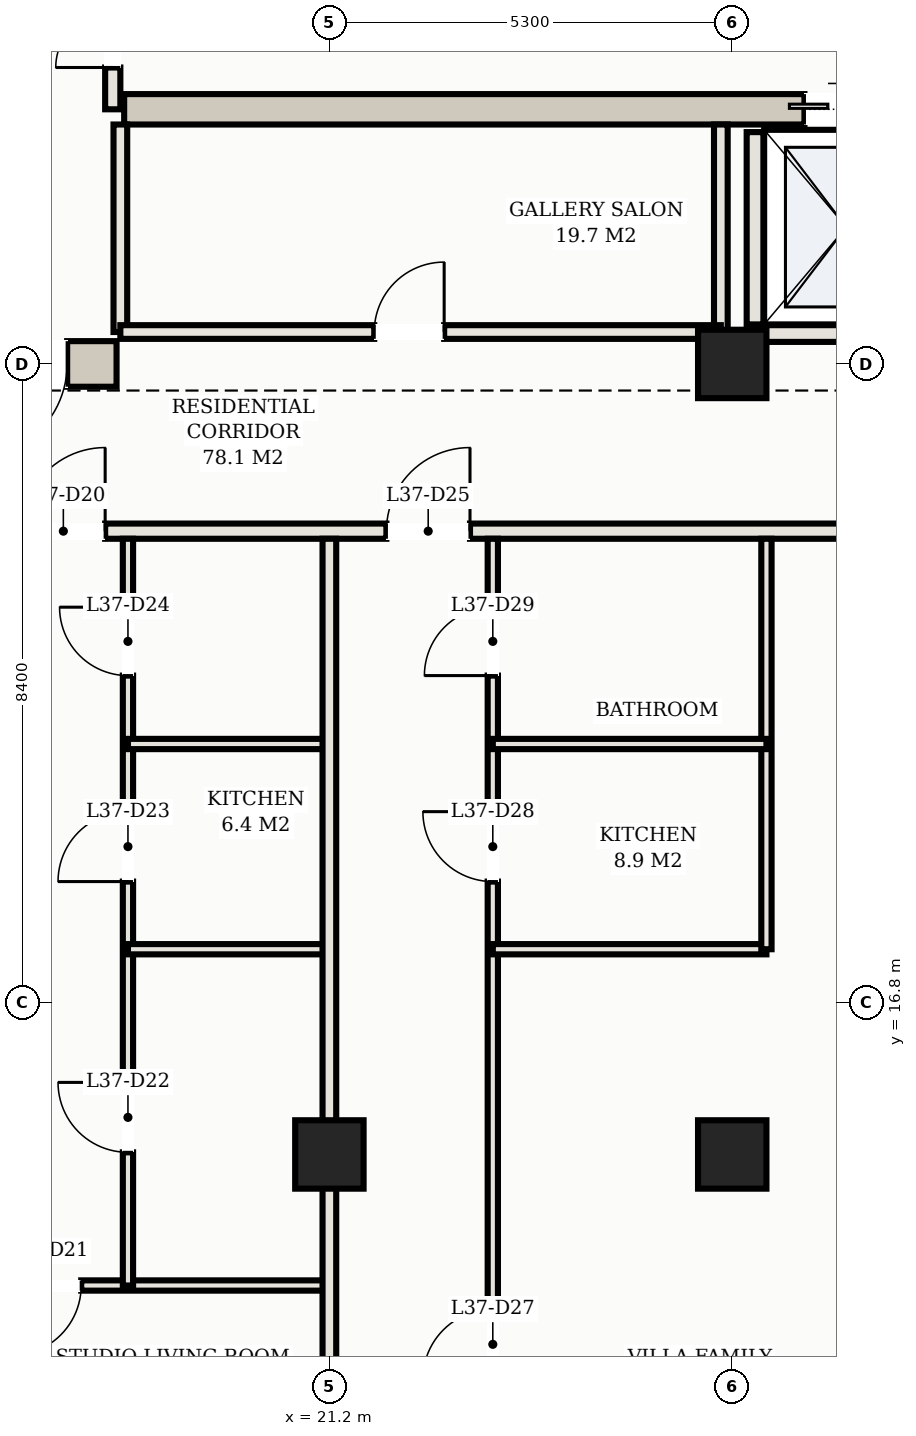
"""IFC4 building model, lengths in metres.
Left out: names, types, materials, properties, quantities, classifications, styles, units other than length and angle.
Written with IfcOpenShell. Run it as: python <this file> out.ifc"""

import sys

from ifc_helpers import new_model, si_unit, direction, frame, frame_2d, origin, origin_2d, place, context, subcontext, project, spatial, rectangle, hollow_rectangle, extrude, element, fill, save


model = new_model("IFC4")
c1 = context("Model", 3, precision=1e-05, world=origin(), true_north=direction((0.0, 1.0)))
c2 = subcontext(c1, "Body", "Model", "MODEL_VIEW")
j1 = project(units=[si_unit("LENGTHUNIT", "METRE"), si_unit("PLANEANGLEUNIT", "RADIAN")], contexts=[c1])
p1 = place(None, origin())
s1 = spatial("IfcSite", under=j1, at=p1, CompositionType="ELEMENT")
p2 = place(p1, origin())
s2 = spatial("IfcBuilding", under=s1, at=p2, CompositionType="ELEMENT")
p3 = place(p2, frame((0.0, 0.0, 139.2)))
s3 = spatial("IfcBuildingStorey", under=s2, at=p3, CompositionType="ELEMENT", Elevation=139.2)
p4 = place(p3, frame((10.3, 25.2, 0.0), z_axis=(0.0, 0.0, 1.0), x_axis=(1.0, 0.0, 0.0)))
e1 = element("IfcWall", 1, at=p4, inside=s3, PredefinedType="SHEAR", context=c2, shape_type="SweptSolid", body=[
    extrude(rectangle(XDim=8.1, YDim=0.6, at=frame_2d((4.05, 0.0))), origin(), (0.0, 0.0, 1.0), 3.1),
])
p5 = place(p4, frame((6.2, 0.0, 0.0)))
e2 = element("IfcOpeningElement", 2, at=p5, cuts=e1, PredefinedType="OPENING", context=c2, shape_type="SweptSolid", body=[
    extrude(rectangle(XDim=1.25, YDim=2.2, at=frame_2d((0.625, 1.1))), frame((0.0, 0.31, 0.0), z_axis=(0.0, -1.0, 0.0), x_axis=(1.0, 0.0, 0.0)), (0.0, 0.0, 1.0), 0.62),
])
p6 = place(p3, frame((18.5, 28.55, 0.0), z_axis=(0.0, 0.0, 1.0), x_axis=(1.0, 0.0, 0.0)))
e3 = element("IfcWall", 3, at=p6, inside=s3, PredefinedType="SHEAR", context=c2, shape_type="SweptSolid", body=[
    extrude(rectangle(XDim=16.0, YDim=0.4, at=frame_2d((8.0, 0.0))), origin(), (0.0, 0.0, 1.0), 3.1),
])
p7 = place(p6, frame((8.95, 0.0, 0.0)))
e4 = element("IfcOpeningElement", 4, at=p7, cuts=e3, PredefinedType="OPENING", context=c2, shape_type="SweptSolid", body=[
    extrude(rectangle(XDim=1.1, YDim=2.15, at=frame_2d((0.55, 1.075))), frame((0.0, 0.21, 0.0), z_axis=(0.0, -1.0, 0.0), x_axis=(1.0, 0.0, 0.0)), (0.0, 0.0, 1.0), 0.42),
])
p8 = place(p6, frame((11.55, 0.0, 0.0)))
e5 = element("IfcOpeningElement", 5, at=p8, cuts=e3, PredefinedType="OPENING", context=c2, shape_type="SweptSolid", body=[
    extrude(rectangle(XDim=1.1, YDim=2.15, at=frame_2d((0.55, 1.075))), frame((0.0, 0.21, 0.0), z_axis=(0.0, -1.0, 0.0), x_axis=(1.0, 0.0, 0.0)), (0.0, 0.0, 1.0), 0.42),
])
p9 = place(p6, frame((14.15, 0.0, 0.0)))
e6 = element("IfcOpeningElement", 6, at=p9, cuts=e3, PredefinedType="OPENING", context=c2, shape_type="SweptSolid", body=[
    extrude(rectangle(XDim=1.1, YDim=2.15, at=frame_2d((0.55, 1.075))), frame((0.0, 0.21, 0.0), z_axis=(0.0, -1.0, 0.0), x_axis=(1.0, 0.0, 0.0)), (0.0, 0.0, 1.0), 0.42),
])
for number, where, z_axis, x_axis in (
    (7, (26.5, 25.2, 0.0), (0.0, 0.0, 1.0), (1.0, 0.0, 0.0)),
    (8, (21.2, 14.8, 0.0), (0.0, 0.0, 1.0), (1.0, 0.0, 0.0)),
    (9, (26.5, 14.8, 0.0), (0.0, 0.0, 1.0), (1.0, 0.0, 0.0)),
):
    element("IfcColumn", number, at=place(p3, frame(where, z_axis=z_axis, x_axis=x_axis)), inside=s3, PredefinedType="COLUMN", context=c2, shape_type="SweptSolid", body=[
        extrude(hollow_rectangle(XDim=0.9, YDim=0.9, WallThickness=0.032, at=origin_2d()), origin(), (0.0, 0.0, 1.0), 3.3),
    ])
p10 = place(p3, frame((26.8, 25.72, 0.0), z_axis=(0.0, 0.0, 1.0), x_axis=(0.0, 1.0, 0.0)))
e10 = element("IfcWall", 10, at=p10, inside=s3, PredefinedType="SOLIDWALL", context=c2, shape_type="SweptSolid", body=[
    extrude(rectangle(XDim=2.53, YDim=0.22, at=frame_2d((1.265, 0.0))), origin(), (0.0, 0.0, 1.0), 3.1),
])
p11 = place(p3, frame((26.92, 25.6, 0.0), z_axis=(0.0, 0.0, 1.0), x_axis=(1.0, 0.0, 0.0)))
e11 = element("IfcWall", 11, at=p11, inside=s3, PredefinedType="SOLIDWALL", context=c2, shape_type="SweptSolid", body=[
    extrude(rectangle(XDim=2.16, YDim=0.22, at=frame_2d((1.08, 0.0))), origin(), (0.0, 0.0, 1.0), 2.295),
])
p12 = place(p3, frame((18.35, 28.55, 0.0), z_axis=(0.0, 0.0, 1.0), x_axis=(0.0, 1.0, 0.0)))
e12 = element("IfcWall", 12, at=p12, inside=s3, PredefinedType="PARTITIONING", context=c2, shape_type="SweptSolid", body=[
    extrude(rectangle(XDim=2.6, YDim=0.2, at=frame_2d((1.3, 0.0))), origin(), (0.0, 0.0, 1.0), 2.38),
])
p13 = place(p12, frame((0.55, 0.0, 0.0)))
e13 = element("IfcOpeningElement", 13, at=p13, cuts=e12, PredefinedType="OPENING", context=c2, shape_type="SweptSolid", body=[
    extrude(rectangle(XDim=1.5, YDim=2.25, at=frame_2d((0.75, 1.125))), frame((0.0, 0.11, 0.0), z_axis=(0.0, -1.0, 0.0), x_axis=(1.0, 0.0, 0.0)), (0.0, 0.0, 1.0), 0.22),
])
for number, where, z_axis, x_axis in (
    (14, (18.45, 25.62, 0.0), (0.0, 0.0, 1.0), (0.0, 1.0, 0.0)),
    (15, (26.35, 25.62, 0.0), (0.0, 0.0, 1.0), (0.0, 1.0, 0.0)),
):
    element("IfcWall", number, at=place(p3, frame(where, z_axis=z_axis, x_axis=x_axis)), inside=s3, PredefinedType="PARTITIONING", context=c2, shape_type="SweptSolid", body=[
        extrude(rectangle(XDim=2.73, YDim=0.18, at=frame_2d((1.365, 0.0))), origin(), (0.0, 0.0, 1.0), 2.38),
    ])
p14 = place(p3, frame((18.45, 25.62, 0.0), z_axis=(0.0, 0.0, 1.0), x_axis=(1.0, 0.0, 0.0)))
e16 = element("IfcWall", 16, at=p14, inside=s3, PredefinedType="PARTITIONING", context=c2, shape_type="SweptSolid", body=[
    extrude(rectangle(XDim=7.9, YDim=0.18, at=frame_2d((3.95, 0.0))), origin(), (0.0, 0.0, 1.0), 2.38),
])
p15 = place(p14, frame((3.34, 0.0, 0.0)))
e17 = element("IfcOpeningElement", 17, at=p15, cuts=e16, PredefinedType="OPENING", context=c2, shape_type="SweptSolid", body=[
    extrude(rectangle(XDim=0.92, YDim=2.15, at=frame_2d((0.46, 1.075))), frame((0.0, 0.1, 0.0), z_axis=(0.0, -1.0, 0.0), x_axis=(1.0, 0.0, 0.0)), (0.0, 0.0, 1.0), 0.2),
])
p16 = place(p3, frame((4.32, 23.0, 0.0), z_axis=(0.0, 0.0, 1.0), x_axis=(1.0, 0.0, 0.0)))
e18 = element("IfcWall", 18, at=p16, inside=s3, PredefinedType="PARTITIONING", context=c2, shape_type="SweptSolid", body=[
    extrude(rectangle(XDim=44.36, YDim=0.2, at=frame_2d((22.18, 0.0))), origin(), (0.0, 0.0, 1.0), 2.38),
])
p17 = place(p16, frame((7.03, 0.0, 0.0)))
e19 = element("IfcOpeningElement", 19, at=p17, cuts=e18, PredefinedType="OPENING", context=c2, shape_type="SweptSolid", body=[
    extrude(rectangle(XDim=1.1, YDim=2.25, at=frame_2d((0.55, 1.125))), frame((0.0, 0.11, 0.0), z_axis=(0.0, -1.0, 0.0), x_axis=(1.0, 0.0, 0.0)), (0.0, 0.0, 1.0), 0.22),
])
p18 = place(p16, frame((12.83, 0.0, 0.0)))
e20 = element("IfcOpeningElement", 20, at=p18, cuts=e18, PredefinedType="OPENING", context=c2, shape_type="SweptSolid", body=[
    extrude(rectangle(XDim=1.1, YDim=2.25, at=frame_2d((0.55, 1.125))), frame((0.0, 0.11, 0.0), z_axis=(0.0, -1.0, 0.0), x_axis=(1.0, 0.0, 0.0)), (0.0, 0.0, 1.0), 0.22),
])
p19 = place(p16, frame((17.63, 0.0, 0.0)))
e21 = element("IfcOpeningElement", 21, at=p19, cuts=e18, PredefinedType="OPENING", context=c2, shape_type="SweptSolid", body=[
    extrude(rectangle(XDim=1.1, YDim=2.25, at=frame_2d((0.55, 1.125))), frame((0.0, 0.11, 0.0), z_axis=(0.0, -1.0, 0.0), x_axis=(1.0, 0.0, 0.0)), (0.0, 0.0, 1.0), 0.22),
])
p20 = place(p16, frame((28.23, 0.0, 0.0)))
e22 = element("IfcOpeningElement", 22, at=p20, cuts=e18, PredefinedType="OPENING", context=c2, shape_type="SweptSolid", body=[
    extrude(rectangle(XDim=1.1, YDim=2.25, at=frame_2d((0.55, 1.125))), frame((0.0, 0.11, 0.0), z_axis=(0.0, -1.0, 0.0), x_axis=(1.0, 0.0, 0.0)), (0.0, 0.0, 1.0), 0.22),
])
p21 = place(p16, frame((2.635, 0.0, 0.0)))
e23 = element("IfcOpeningElement", 23, at=p21, cuts=e18, PredefinedType="OPENING", context=c2, shape_type="SweptSolid", body=[
    extrude(rectangle(XDim=0.92, YDim=2.15, at=frame_2d((0.46, 1.075))), frame((0.0, 0.11, 0.0), z_axis=(0.0, -1.0, 0.0), x_axis=(1.0, 0.0, 0.0)), (0.0, 0.0, 1.0), 0.22),
])
p22 = place(p16, frame((40.805, 0.0, 0.0)))
e24 = element("IfcOpeningElement", 24, at=p22, cuts=e18, PredefinedType="OPENING", context=c2, shape_type="SweptSolid", body=[
    extrude(rectangle(XDim=0.92, YDim=2.15, at=frame_2d((0.46, 1.075))), frame((0.0, 0.11, 0.0), z_axis=(0.0, -1.0, 0.0), x_axis=(1.0, 0.0, 0.0)), (0.0, 0.0, 1.0), 0.22),
])
p23 = place(p3, frame((16.4, 13.076, 0.0), z_axis=(0.0, 0.0, 1.0), x_axis=(1.0, 0.0, 0.0)))
e25 = element("IfcWall", 25, at=p23, inside=s3, PredefinedType="PARTITIONING", context=c2, shape_type="SweptSolid", body=[
    extrude(rectangle(XDim=4.8, YDim=0.135, at=frame_2d((2.4, 0.0))), origin(), (0.0, 0.0, 1.0), 2.38),
])
p24 = place(p23, frame((0.615, 0.0, 0.0)))
e26 = element("IfcOpeningElement", 26, at=p24, cuts=e25, PredefinedType="OPENING", context=c2, shape_type="SweptSolid", body=[
    extrude(rectangle(XDim=0.92, YDim=2.15, at=frame_2d((0.46, 1.075))), frame((0.0, 0.078, 0.0), z_axis=(0.0, -1.0, 0.0), x_axis=(1.0, 0.0, 0.0)), (0.0, 0.0, 1.0), 0.155),
])
p25 = place(p3, frame((18.55, 13.076, 0.0), z_axis=(0.0, 0.0, 1.0), x_axis=(0.0, 1.0, 0.0)))
e27 = element("IfcWall", 27, at=p25, inside=s3, PredefinedType="PARTITIONING", context=c2, shape_type="SweptSolid", body=[
    extrude(rectangle(XDim=9.824, YDim=0.135, at=frame_2d((4.912, 0.0))), origin(), (0.0, 0.0, 1.0), 2.38),
])
p26 = place(p25, frame((1.752, 0.0, 0.0)))
e28 = element("IfcOpeningElement", 28, at=p26, cuts=e27, PredefinedType="OPENING", context=c2, shape_type="SweptSolid", body=[
    extrude(rectangle(XDim=0.92, YDim=2.15, at=frame_2d((0.46, 1.075))), frame((0.0, 0.078, 0.0), z_axis=(0.0, -1.0, 0.0), x_axis=(1.0, 0.0, 0.0)), (0.0, 0.0, 1.0), 0.155),
])
p27 = place(p25, frame((5.314, 0.0, 0.0)))
e29 = element("IfcOpeningElement", 29, at=p27, cuts=e27, PredefinedType="OPENING", context=c2, shape_type="SweptSolid", body=[
    extrude(rectangle(XDim=0.92, YDim=2.15, at=frame_2d((0.46, 1.075))), frame((0.0, 0.078, 0.0), z_axis=(0.0, -1.0, 0.0), x_axis=(1.0, 0.0, 0.0)), (0.0, 0.0, 1.0), 0.155),
])
p28 = place(p25, frame((8.024, 0.0, 0.0)))
e30 = element("IfcOpeningElement", 30, at=p28, cuts=e27, PredefinedType="OPENING", context=c2, shape_type="SweptSolid", body=[
    extrude(rectangle(XDim=0.9, YDim=2.15, at=frame_2d((0.45, 1.075))), frame((0.0, 0.078, 0.0), z_axis=(0.0, -1.0, 0.0), x_axis=(1.0, 0.0, 0.0)), (0.0, 0.0, 1.0), 0.155),
])
for number, where, z_axis, x_axis in (
    (31, (18.55, 17.5, 0.0), (0.0, 0.0, 1.0), (1.0, 0.0, 0.0)),
    (32, (18.55, 20.2, 0.0), (0.0, 0.0, 1.0), (1.0, 0.0, 0.0)),
):
    element("IfcWall", number, at=place(p3, frame(where, z_axis=z_axis, x_axis=x_axis)), inside=s3, PredefinedType="PARTITIONING", context=c2, shape_type="SweptSolid", body=[
        extrude(rectangle(XDim=2.65, YDim=0.135, at=frame_2d((1.325, 0.0))), origin(), (0.0, 0.0, 1.0), 2.38),
    ])
p29 = place(p3, frame((21.2, 2.508, 0.0), z_axis=(0.0, 0.0, 1.0), x_axis=(0.0, 1.0, 0.0)))
e33 = element("IfcWall", 33, at=p29, inside=s3, PredefinedType="PARTITIONING", context=c2, shape_type="SweptSolid", body=[
    extrude(rectangle(XDim=20.392, YDim=0.18, at=frame_2d((10.196, 0.0))), origin(), (0.0, 0.0, 1.0), 2.38),
])
p30 = place(p3, frame((23.35, 7.103, 0.0), z_axis=(0.0, 0.0, 1.0), x_axis=(0.0, 1.0, 0.0)))
e34 = element("IfcWall", 34, at=p30, inside=s3, PredefinedType="PARTITIONING", context=c2, shape_type="SweptSolid", body=[
    extrude(rectangle(XDim=15.797, YDim=0.135, at=frame_2d((7.898, 0.0))), origin(), (0.0, 0.0, 1.0), 2.38),
])
p31 = place(p30, frame((4.739, 0.0, 0.0)))
e35 = element("IfcOpeningElement", 35, at=p31, cuts=e34, PredefinedType="OPENING", context=c2, shape_type="SweptSolid", body=[
    extrude(rectangle(XDim=0.92, YDim=2.15, at=frame_2d((0.46, 1.075))), frame((0.0, 0.078, 0.0), z_axis=(0.0, -1.0, 0.0), x_axis=(1.0, 0.0, 0.0)), (0.0, 0.0, 1.0), 0.155),
])
p32 = place(p30, frame((11.287, 0.0, 0.0)))
e36 = element("IfcOpeningElement", 36, at=p32, cuts=e34, PredefinedType="OPENING", context=c2, shape_type="SweptSolid", body=[
    extrude(rectangle(XDim=0.92, YDim=2.15, at=frame_2d((0.46, 1.075))), frame((0.0, 0.078, 0.0), z_axis=(0.0, -1.0, 0.0), x_axis=(1.0, 0.0, 0.0)), (0.0, 0.0, 1.0), 0.155),
])
p33 = place(p30, frame((13.997, 0.0, 0.0)))
e37 = element("IfcOpeningElement", 37, at=p33, cuts=e34, PredefinedType="OPENING", context=c2, shape_type="SweptSolid", body=[
    extrude(rectangle(XDim=0.9, YDim=2.15, at=frame_2d((0.45, 1.075))), frame((0.0, 0.078, 0.0), z_axis=(0.0, -1.0, 0.0), x_axis=(1.0, 0.0, 0.0)), (0.0, 0.0, 1.0), 0.155),
])
p34 = place(p3, frame((23.35, 17.5, 0.0), z_axis=(0.0, 0.0, 1.0), x_axis=(1.0, 0.0, 0.0)))
e38 = element("IfcWall", 38, at=p34, inside=s3, PredefinedType="PARTITIONING", context=c2, shape_type="SweptSolid", body=[
    extrude(rectangle(XDim=3.6, YDim=0.135, at=frame_2d((1.8, 0.0))), origin(), (0.0, 0.0, 1.0), 2.38),
])
p35 = place(p3, frame((26.95, 17.5, 0.0), z_axis=(0.0, 0.0, 1.0), x_axis=(0.0, 1.0, 0.0)))
e39 = element("IfcWall", 39, at=p35, inside=s3, PredefinedType="PARTITIONING", context=c2, shape_type="SweptSolid", body=[
    extrude(rectangle(XDim=5.4, YDim=0.135, at=frame_2d((2.7, 0.0))), origin(), (0.0, 0.0, 1.0), 2.38),
])
p36 = place(p3, frame((23.35, 20.2, 0.0), z_axis=(0.0, 0.0, 1.0), x_axis=(1.0, 0.0, 0.0)))
e40 = element("IfcWall", 40, at=p36, inside=s3, PredefinedType="PARTITIONING", context=c2, shape_type="SweptSolid", body=[
    extrude(rectangle(XDim=3.6, YDim=0.135, at=frame_2d((1.8, 0.0))), origin(), (0.0, 0.0, 1.0), 2.38),
])
p37 = place(p7, origin())
e41 = element("IfcDoor", 41, at=p37, inside=s3, OperationType="DOUBLE_DOOR_SLIDING", PredefinedType="DOOR", context=c2, shape_type="SweptSolid", body=[
    extrude(rectangle(XDim=1.1, YDim=2.15, at=frame_2d((0.55, 1.075))), frame((0.0, 0.025, 0.0), z_axis=(0.0, -1.0, 0.0), x_axis=(1.0, 0.0, 0.0)), (0.0, 0.0, 1.0), 0.05),
])
fill(e4, e41)
p38 = place(p5, frame((1.25, 0.0, 0.0), z_axis=(0.0, 0.0, 1.0), x_axis=(-1.0, 0.0, 0.0)))
e42 = element("IfcDoor", 42, at=p38, inside=s3, OperationType="SINGLE_SWING_RIGHT", PredefinedType="DOOR", context=c2, shape_type="SweptSolid", body=[
    extrude(rectangle(XDim=1.25, YDim=2.2, at=frame_2d((0.625, 1.1))), frame((0.0, 0.025, 0.0), z_axis=(0.0, -1.0, 0.0), x_axis=(1.0, 0.0, 0.0)), (0.0, 0.0, 1.0), 0.05),
])
fill(e2, e42)
p39 = place(p13, origin())
e43 = element("IfcDoor", 43, at=p39, inside=s3, OperationType="DOUBLE_DOOR_SINGLE_SWING", PredefinedType="DOOR", context=c2, shape_type="SweptSolid", body=[
    extrude(rectangle(XDim=1.5, YDim=2.25, at=frame_2d((0.75, 1.125))), frame((0.0, 0.025, 0.0), z_axis=(0.0, -1.0, 0.0), x_axis=(1.0, 0.0, 0.0)), (0.0, 0.0, 1.0), 0.05),
])
fill(e13, e43)
p40 = place(p15, origin())
e44 = element("IfcDoor", 44, at=p40, inside=s3, OperationType="SINGLE_SWING_RIGHT", PredefinedType="DOOR", context=c2, shape_type="SweptSolid", body=[
    extrude(rectangle(XDim=0.92, YDim=2.15, at=frame_2d((0.46, 1.075))), frame((0.0, 0.025, 0.0), z_axis=(0.0, -1.0, 0.0), x_axis=(1.0, 0.0, 0.0)), (0.0, 0.0, 1.0), 0.05),
])
fill(e17, e44)
p41 = place(p18, origin())
e45 = element("IfcDoor", 45, at=p41, inside=s3, OperationType="SINGLE_SWING_RIGHT", PredefinedType="DOOR", context=c2, shape_type="SweptSolid", body=[
    extrude(rectangle(XDim=1.1, YDim=2.25, at=frame_2d((0.55, 1.125))), frame((0.0, 0.025, 0.0), z_axis=(0.0, -1.0, 0.0), x_axis=(1.0, 0.0, 0.0)), (0.0, 0.0, 1.0), 0.05),
])
fill(e20, e45)
p42 = place(p24, frame((0.92, 0.0, 0.0), z_axis=(0.0, 0.0, 1.0), x_axis=(-1.0, 0.0, 0.0)))
e46 = element("IfcDoor", 46, at=p42, inside=s3, OperationType="SINGLE_SWING_RIGHT", PredefinedType="DOOR", context=c2, shape_type="SweptSolid", body=[
    extrude(rectangle(XDim=0.92, YDim=2.15, at=frame_2d((0.46, 1.075))), frame((0.0, 0.025, 0.0), z_axis=(0.0, -1.0, 0.0), x_axis=(1.0, 0.0, 0.0)), (0.0, 0.0, 1.0), 0.05),
])
fill(e26, e46)
p43 = place(p26, origin())
e47 = element("IfcDoor", 47, at=p43, inside=s3, OperationType="SINGLE_SWING_RIGHT", PredefinedType="DOOR", context=c2, shape_type="SweptSolid", body=[
    extrude(rectangle(XDim=0.92, YDim=2.15, at=frame_2d((0.46, 1.075))), frame((0.0, 0.025, 0.0), z_axis=(0.0, -1.0, 0.0), x_axis=(1.0, 0.0, 0.0)), (0.0, 0.0, 1.0), 0.05),
])
fill(e28, e47)
p44 = place(p27, origin())
e48 = element("IfcDoor", 48, at=p44, inside=s3, OperationType="SINGLE_SWING_LEFT", PredefinedType="DOOR", context=c2, shape_type="SweptSolid", body=[
    extrude(rectangle(XDim=0.92, YDim=2.15, at=frame_2d((0.46, 1.075))), frame((0.0, 0.025, 0.0), z_axis=(0.0, -1.0, 0.0), x_axis=(1.0, 0.0, 0.0)), (0.0, 0.0, 1.0), 0.05),
])
fill(e29, e48)
p45 = place(p28, origin())
e49 = element("IfcDoor", 49, at=p45, inside=s3, OperationType="SINGLE_SWING_RIGHT", PredefinedType="DOOR", context=c2, shape_type="SweptSolid", body=[
    extrude(rectangle(XDim=0.9, YDim=2.15, at=frame_2d((0.45, 1.075))), frame((0.0, 0.025, 0.0), z_axis=(0.0, -1.0, 0.0), x_axis=(1.0, 0.0, 0.0)), (0.0, 0.0, 1.0), 0.05),
])
fill(e30, e49)
p46 = place(p19, origin())
e50 = element("IfcDoor", 50, at=p46, inside=s3, OperationType="SINGLE_SWING_RIGHT", PredefinedType="DOOR", context=c2, shape_type="SweptSolid", body=[
    extrude(rectangle(XDim=1.1, YDim=2.25, at=frame_2d((0.55, 1.125))), frame((0.0, 0.025, 0.0), z_axis=(0.0, -1.0, 0.0), x_axis=(1.0, 0.0, 0.0)), (0.0, 0.0, 1.0), 0.05),
])
fill(e21, e50)
p47 = place(p31, origin())
e51 = element("IfcDoor", 51, at=p47, inside=s3, OperationType="SINGLE_SWING_LEFT", PredefinedType="DOOR", context=c2, shape_type="SweptSolid", body=[
    extrude(rectangle(XDim=0.92, YDim=2.15, at=frame_2d((0.46, 1.075))), frame((0.0, 0.025, 0.0), z_axis=(0.0, -1.0, 0.0), x_axis=(1.0, 0.0, 0.0)), (0.0, 0.0, 1.0), 0.05),
])
fill(e35, e51)
p48 = place(p32, origin())
e52 = element("IfcDoor", 52, at=p48, inside=s3, OperationType="SINGLE_SWING_RIGHT", PredefinedType="DOOR", context=c2, shape_type="SweptSolid", body=[
    extrude(rectangle(XDim=0.92, YDim=2.15, at=frame_2d((0.46, 1.075))), frame((0.0, 0.025, 0.0), z_axis=(0.0, -1.0, 0.0), x_axis=(1.0, 0.0, 0.0)), (0.0, 0.0, 1.0), 0.05),
])
fill(e36, e52)
p49 = place(p33, origin())
e53 = element("IfcDoor", 53, at=p49, inside=s3, OperationType="SINGLE_SWING_LEFT", PredefinedType="DOOR", context=c2, shape_type="SweptSolid", body=[
    extrude(rectangle(XDim=0.9, YDim=2.15, at=frame_2d((0.45, 1.075))), frame((0.0, 0.025, 0.0), z_axis=(0.0, -1.0, 0.0), x_axis=(1.0, 0.0, 0.0)), (0.0, 0.0, 1.0), 0.05),
])
fill(e37, e53)
save(model, sys.argv[1])
